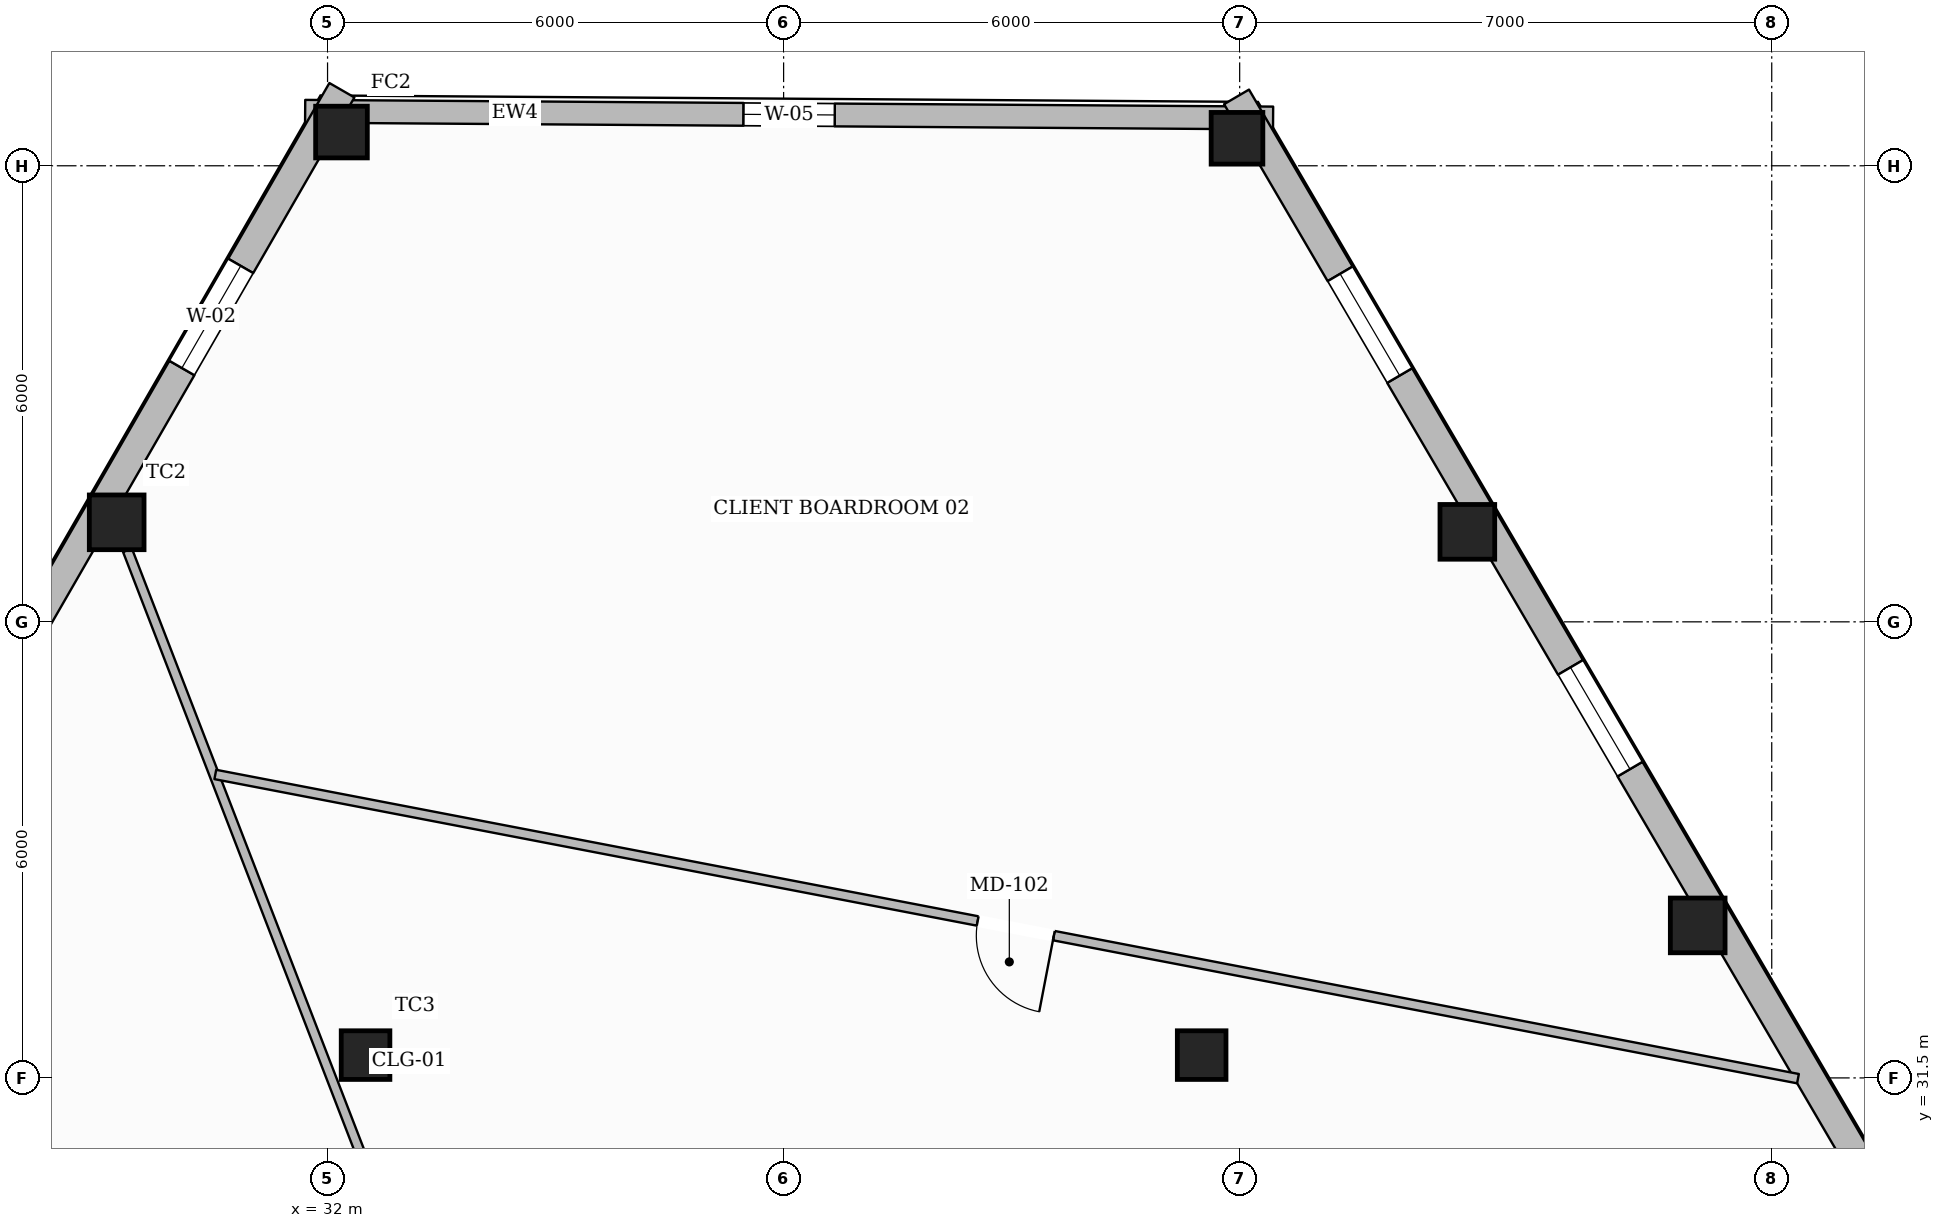
"""IFC4 building model, lengths in metres.
Left out: names, types, materials, properties, quantities, classifications, styles, units other than length and angle.
Written with IfcOpenShell. Run it as: python <this file> out.ifc"""

import sys

from ifc_helpers import new_model, si_unit, direction, frame, frame_2d, origin, origin_2d, place, context, subcontext, project, spatial, rectangle, hollow_rectangle, extrude, element, fill, save


model = new_model("IFC4")
c1 = context("Model", 3, precision=1e-05, world=origin(), true_north=direction((0.0, 1.0)))
c2 = subcontext(c1, "Body", "Model", "MODEL_VIEW")
j1 = project(units=[si_unit("LENGTHUNIT", "METRE"), si_unit("PLANEANGLEUNIT", "RADIAN")], contexts=[c1])
p1 = place(None, origin())
s1 = spatial("IfcSite", under=j1, at=p1, CompositionType="ELEMENT")
p2 = place(p1, origin())
s2 = spatial("IfcBuilding", under=s1, at=p2, CompositionType="ELEMENT")
p3 = place(p2, frame((0.0, 0.0, 120.15)))
s3 = spatial("IfcBuildingStorey", under=s2, at=p3, CompositionType="ELEMENT", Elevation=120.15)
p4 = place(p3, frame((32.183, 43.944, 0.0), z_axis=(0.0, 0.0, 1.0), x_axis=(1.0, 0.0, 0.0)))
e1 = element("IfcColumn", 1, at=p4, inside=s3, PredefinedType="COLUMN", context=c2, shape_type="SweptSolid", body=[
    extrude(hollow_rectangle(XDim=0.68, YDim=0.68, WallThickness=0.03, at=origin_2d()), origin(), (0.0, 0.0, 1.0), 3.6),
])
for number, where, z_axis, x_axis in (
    (2, (29.226, 38.809, 0.0), (0.0, 0.0, 1.0), (1.0, 0.0, 0.0)),
    (3, (50.026, 33.506, 0.0), (0.0, 0.0, 1.0), (1.0, 0.0, 0.0)),
    (4, (46.996, 38.684, 0.0), (0.0, 0.0, 1.0), (1.0, 0.0, 0.0)),
):
    element("IfcColumn", number, at=place(p3, frame(where, z_axis=z_axis, x_axis=x_axis)), inside=s3, PredefinedType="COLUMN", context=c2, shape_type="SweptSolid", body=[
        extrude(hollow_rectangle(XDim=0.72, YDim=0.72, WallThickness=0.032, at=origin_2d()), origin(), (0.0, 0.0, 1.0), 3.6),
    ])
p5 = place(p3, frame((43.965, 43.862, 0.0), z_axis=(0.0, 0.0, 1.0), x_axis=(1.0, 0.0, 0.0)))
e5 = element("IfcColumn", 5, at=p5, inside=s3, PredefinedType="COLUMN", context=c2, shape_type="SweptSolid", body=[
    extrude(hollow_rectangle(XDim=0.68, YDim=0.68, WallThickness=0.03, at=origin_2d()), origin(), (0.0, 0.0, 1.0), 3.6),
])
for number, where, z_axis, x_axis in (
    (6, (32.5, 31.8, 0.0), (0.0, 0.0, 1.0), (1.0, 0.0, 0.0)),
    (7, (43.5, 31.8, 0.0), (0.0, 0.0, 1.0), (1.0, 0.0, 0.0)),
):
    element("IfcColumn", number, at=place(p3, frame(where, z_axis=z_axis, x_axis=x_axis)), inside=s3, PredefinedType="COLUMN", context=c2, shape_type="SweptSolid", body=[
        extrude(hollow_rectangle(XDim=0.64, YDim=0.64, WallThickness=0.028, at=origin_2d()), origin(), (0.0, 0.0, 1.0), 3.6),
    ])
p6 = place(p3, frame((31.706, 44.217, 0.0), z_axis=(0.0, 0.0, 1.0), x_axis=(0.999975916869, -0.006940149963, 0.0)))
e8 = element("IfcWall", 8, at=p6, inside=s3, PredefinedType="STANDARD", context=c2, shape_type="SweptSolid", body=[
    extrude(rectangle(XDim=12.734, YDim=0.3, at=frame_2d((6.367, 0.0))), origin(), (0.0, 0.0, 1.0), 3.059),
])
p7 = place(p6, frame((5.767, 0.0, 0.65)))
e9 = element("IfcOpeningElement", 9, at=p7, cuts=e8, PredefinedType="OPENING", context=c2, shape_type="SweptSolid", body=[
    extrude(rectangle(XDim=1.2, YDim=1.7, at=frame_2d((0.6, 0.85))), frame((0.0, 0.16, 0.0), z_axis=(0.0, -1.0, 0.0), x_axis=(1.0, 0.0, 0.0)), (0.0, 0.0, 1.0), 0.32),
])
p8 = place(p3, frame((13.966, 12.858, 0.0), z_axis=(0.0, 0.0, 1.0), x_axis=(0.499138995893, 0.86652193439, 0.0)))
e10 = element("IfcWall", 10, at=p8, inside=s3, PredefinedType="STANDARD", context=c2, shape_type="SweptSolid", body=[
    extrude(rectangle(XDim=36.509, YDim=0.38, at=frame_2d((18.255, 0.0))), origin(), (0.0, 0.0, 1.0), 3.059),
])
p9 = place(p8, frame((8.727, 0.0, 0.0)))
e11 = element("IfcOpeningElement", 11, at=p9, cuts=e10, PredefinedType="OPENING", context=c2, shape_type="SweptSolid", body=[
    extrude(rectangle(XDim=1.0, YDim=2.2, at=frame_2d((0.5, 1.1))), frame((0.0, 0.2, 0.0), z_axis=(0.0, -1.0, 0.0), x_axis=(1.0, 0.0, 0.0)), (0.0, 0.0, 1.0), 0.4),
])
p10 = place(p8, frame((32.292, 0.0, 0.65)))
e12 = element("IfcOpeningElement", 12, at=p10, cuts=e10, PredefinedType="OPENING", context=c2, shape_type="SweptSolid", body=[
    extrude(rectangle(XDim=1.55, YDim=1.75, at=frame_2d((0.775, 0.875))), frame((0.0, 0.2, 0.0), z_axis=(0.0, -1.0, 0.0), x_axis=(1.0, 0.0, 0.0)), (0.0, 0.0, 1.0), 0.4),
])
p11 = place(p8, frame((26.367, 0.0, 0.65)))
e13 = element("IfcOpeningElement", 13, at=p11, cuts=e10, PredefinedType="OPENING", context=c2, shape_type="SweptSolid", body=[
    extrude(rectangle(XDim=1.55, YDim=1.75, at=frame_2d((0.775, 0.875))), frame((0.0, 0.2, 0.0), z_axis=(0.0, -1.0, 0.0), x_axis=(1.0, 0.0, 0.0)), (0.0, 0.0, 1.0), 0.4),
])
p12 = place(p8, frame((20.442, 0.0, 0.65)))
e14 = element("IfcOpeningElement", 14, at=p12, cuts=e10, PredefinedType="OPENING", context=c2, shape_type="SweptSolid", body=[
    extrude(rectangle(XDim=1.55, YDim=1.75, at=frame_2d((0.775, 0.875))), frame((0.0, 0.2, 0.0), z_axis=(0.0, -1.0, 0.0), x_axis=(1.0, 0.0, 0.0)), (0.0, 0.0, 1.0), 0.4),
])
p13 = place(p8, frame((2.666, 0.0, 0.65)))
e15 = element("IfcOpeningElement", 15, at=p13, cuts=e10, PredefinedType="OPENING", context=c2, shape_type="SweptSolid", body=[
    extrude(rectangle(XDim=1.55, YDim=1.75, at=frame_2d((0.775, 0.875))), frame((0.0, 0.2, 0.0), z_axis=(0.0, -1.0, 0.0), x_axis=(1.0, 0.0, 0.0)), (0.0, 0.0, 1.0), 0.4),
])
p14 = place(p3, frame((43.959, 44.406, 0.0), z_axis=(0.0, 0.0, 1.0), x_axis=(0.50514079069, -0.863036952616, 0.0)))
e16 = element("IfcWall", 16, at=p14, inside=s3, PredefinedType="STANDARD", context=c2, shape_type="SweptSolid", body=[
    extrude(rectangle(XDim=36.948, YDim=0.38, at=frame_2d((18.474, 0.0))), origin(), (0.0, 0.0, 1.0), 3.059),
])
p15 = place(p14, frame((32.695, 0.0, 0.65)))
e17 = element("IfcOpeningElement", 17, at=p15, cuts=e16, PredefinedType="OPENING", context=c2, shape_type="SweptSolid", body=[
    extrude(rectangle(XDim=1.55, YDim=1.75, at=frame_2d((0.775, 0.875))), frame((0.0, 0.2, 0.0), z_axis=(0.0, -1.0, 0.0), x_axis=(1.0, 0.0, 0.0)), (0.0, 0.0, 1.0), 0.4),
])
p16 = place(p14, frame((26.696, 0.0, 0.65)))
e18 = element("IfcOpeningElement", 18, at=p16, cuts=e16, PredefinedType="OPENING", context=c2, shape_type="SweptSolid", body=[
    extrude(rectangle(XDim=1.55, YDim=1.75, at=frame_2d((0.775, 0.875))), frame((0.0, 0.2, 0.0), z_axis=(0.0, -1.0, 0.0), x_axis=(1.0, 0.0, 0.0)), (0.0, 0.0, 1.0), 0.4),
])
p17 = place(p14, frame((20.696, 0.0, 0.65)))
e19 = element("IfcOpeningElement", 19, at=p17, cuts=e16, PredefinedType="OPENING", context=c2, shape_type="SweptSolid", body=[
    extrude(rectangle(XDim=1.55, YDim=1.75, at=frame_2d((0.775, 0.875))), frame((0.0, 0.2, 0.0), z_axis=(0.0, -1.0, 0.0), x_axis=(1.0, 0.0, 0.0)), (0.0, 0.0, 1.0), 0.4),
])
p18 = place(p14, frame((8.697, 0.0, 0.65)))
e20 = element("IfcOpeningElement", 20, at=p18, cuts=e16, PredefinedType="OPENING", context=c2, shape_type="SweptSolid", body=[
    extrude(rectangle(XDim=1.55, YDim=1.75, at=frame_2d((0.775, 0.875))), frame((0.0, 0.2, 0.0), z_axis=(0.0, -1.0, 0.0), x_axis=(1.0, 0.0, 0.0)), (0.0, 0.0, 1.0), 0.4),
])
p19 = place(p14, frame((2.698, 0.0, 0.65)))
e21 = element("IfcOpeningElement", 21, at=p19, cuts=e16, PredefinedType="OPENING", context=c2, shape_type="SweptSolid", body=[
    extrude(rectangle(XDim=1.55, YDim=1.75, at=frame_2d((0.775, 0.875))), frame((0.0, 0.2, 0.0), z_axis=(0.0, -1.0, 0.0), x_axis=(1.0, 0.0, 0.0)), (0.0, 0.0, 1.0), 0.4),
])
p20 = place(p3, frame((34.511, 25.131, 0.0), z_axis=(0.0, 0.0, 1.0), x_axis=(-0.360420932728, 0.932789767982, 0.0)))
e22 = element("IfcWall", 22, at=p20, inside=s3, PredefinedType="PARTITIONING", context=c2, shape_type="SweptSolid", body=[
    extrude(rectangle(XDim=14.27, YDim=0.125, at=frame_2d((7.135, 0.0))), origin(), (0.0, 0.0, 1.0), 3.141),
])
p21 = place(p3, frame((51.345, 31.49, 0.0), z_axis=(0.0, 0.0, 1.0), x_axis=(-0.982025578243, 0.188747883902, 0.0)))
e23 = element("IfcWall", 23, at=p21, inside=s3, PredefinedType="PARTITIONING", context=c2, shape_type="SweptSolid", body=[
    extrude(rectangle(XDim=21.203, YDim=0.125, at=frame_2d((10.601, 0.0))), origin(), (0.0, 0.0, 1.0), 3.288),
])
p22 = place(p21, frame((9.969, 0.0, 0.0)))
e24 = element("IfcOpeningElement", 24, at=p22, cuts=e23, PredefinedType="OPENING", context=c2, shape_type="SweptSolid", body=[
    extrude(rectangle(XDim=1.02, YDim=2.15, at=frame_2d((0.51, 1.075))), frame((0.0, 0.073, 0.0), z_axis=(0.0, -1.0, 0.0), x_axis=(1.0, 0.0, 0.0)), (0.0, 0.0, 1.0), 0.145),
])
p23 = place(p10, origin())
e25 = element("IfcWindow", 25, at=p23, inside=s3, PartitioningType="SINGLE_PANEL", PredefinedType="WINDOW", context=c2, shape_type="SweptSolid", body=[
    extrude(rectangle(XDim=1.55, YDim=1.75, at=frame_2d((0.775, 0.875))), frame((0.0, 0.03, 0.0), z_axis=(0.0, -1.0, 0.0), x_axis=(1.0, 0.0, 0.0)), (0.0, 0.0, 1.0), 0.06),
])
fill(e12, e25)
p24 = place(p18, origin())
e26 = element("IfcWindow", 26, at=p24, inside=s3, PartitioningType="SINGLE_PANEL", PredefinedType="WINDOW", context=c2, shape_type="SweptSolid", body=[
    extrude(rectangle(XDim=1.55, YDim=1.75, at=frame_2d((0.775, 0.875))), frame((0.0, 0.03, 0.0), z_axis=(0.0, -1.0, 0.0), x_axis=(1.0, 0.0, 0.0)), (0.0, 0.0, 1.0), 0.06),
])
fill(e20, e26)
p25 = place(p19, origin())
e27 = element("IfcWindow", 27, at=p25, inside=s3, PartitioningType="SINGLE_PANEL", PredefinedType="WINDOW", context=c2, shape_type="SweptSolid", body=[
    extrude(rectangle(XDim=1.55, YDim=1.75, at=frame_2d((0.775, 0.875))), frame((0.0, 0.03, 0.0), z_axis=(0.0, -1.0, 0.0), x_axis=(1.0, 0.0, 0.0)), (0.0, 0.0, 1.0), 0.06),
])
fill(e21, e27)
p26 = place(p7, origin())
e28 = element("IfcWindow", 28, at=p26, inside=s3, PartitioningType="SINGLE_PANEL", PredefinedType="WINDOW", context=c2, shape_type="SweptSolid", body=[
    extrude(rectangle(XDim=1.2, YDim=1.7, at=frame_2d((0.6, 0.85))), frame((0.0, 0.03, 0.0), z_axis=(0.0, -1.0, 0.0), x_axis=(1.0, 0.0, 0.0)), (0.0, 0.0, 1.0), 0.06),
])
fill(e9, e28)
p27 = place(p22, origin())
e29 = element("IfcDoor", 29, at=p27, inside=s3, OperationType="SINGLE_SWING_LEFT", PredefinedType="DOOR", context=c2, shape_type="SweptSolid", body=[
    extrude(rectangle(XDim=1.02, YDim=2.15, at=frame_2d((0.51, 1.075))), frame((0.0, 0.025, 0.0), z_axis=(0.0, -1.0, 0.0), x_axis=(1.0, 0.0, 0.0)), (0.0, 0.0, 1.0), 0.05),
])
fill(e24, e29)
save(model, sys.argv[1])
